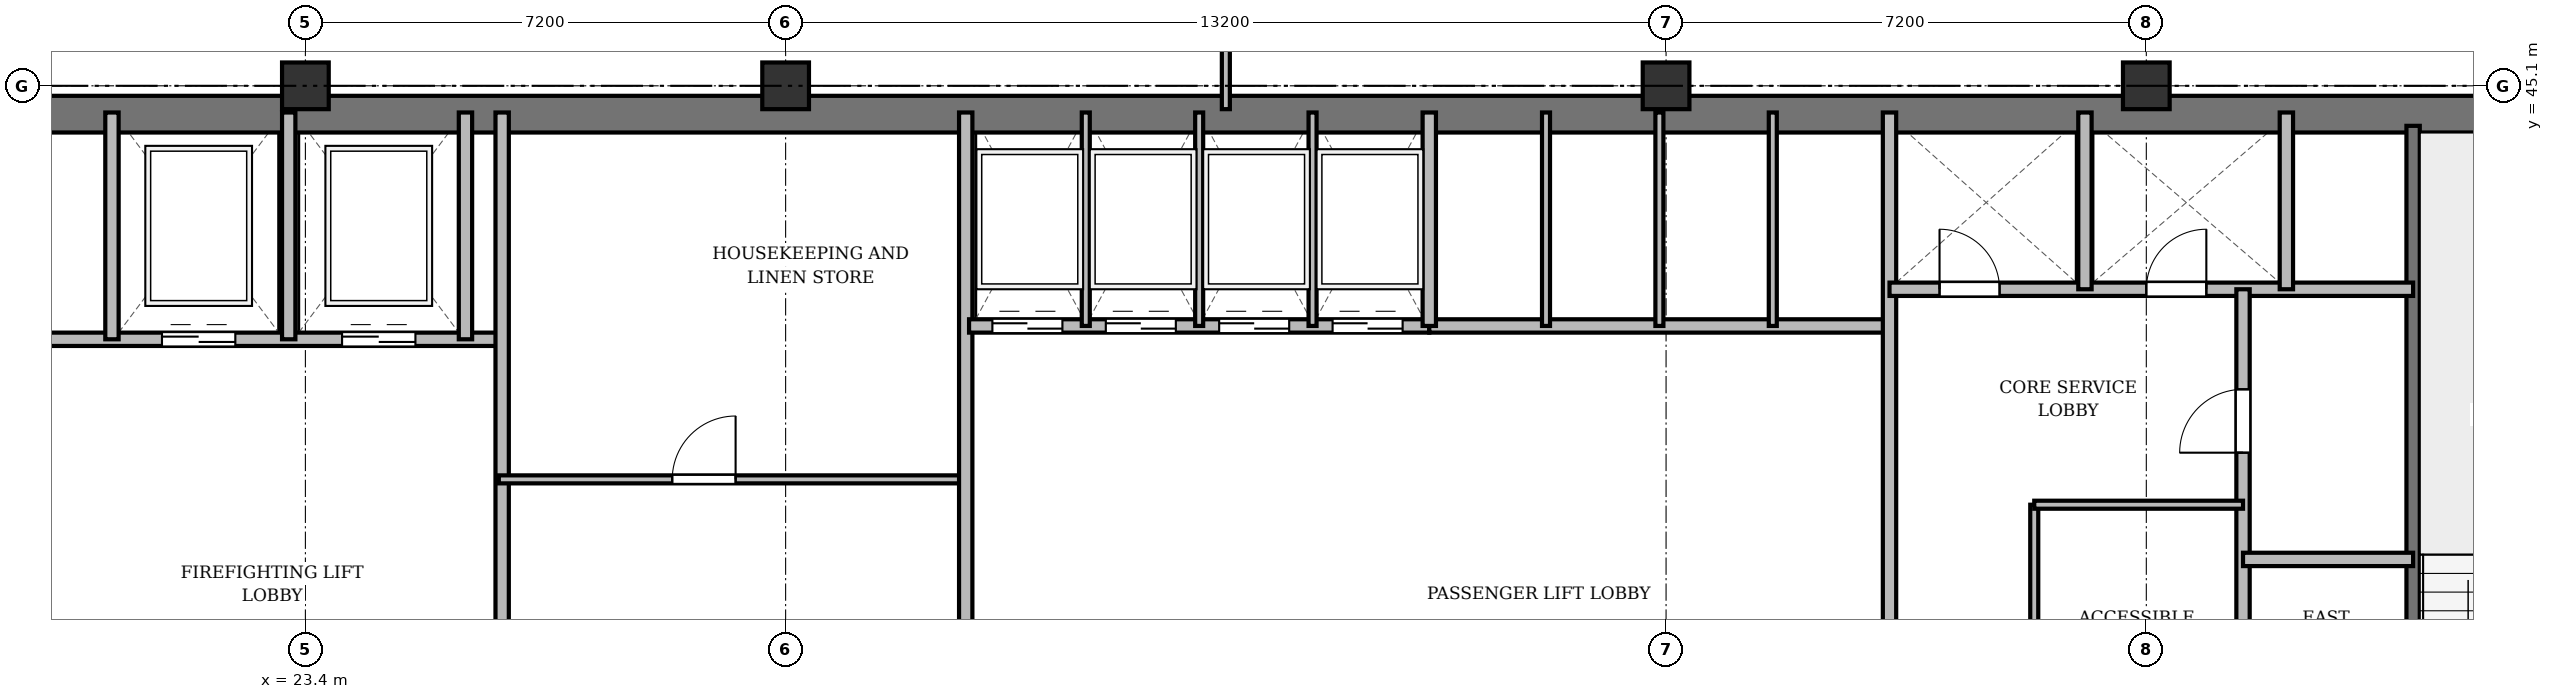
"""IFC4 building model, lengths in metres.
Left out: names, types, materials, properties, quantities, classifications, styles, units other than length and angle.
Written with IfcOpenShell. Run it as: python <this file> out.ifc"""

import sys

from ifc_helpers import new_model, si_unit, direction, frame, frame_2d, origin, origin_2d, place, context, subcontext, project, spatial, rectangle, extrude, source, transform, mapped, element, fill, save


model = new_model("IFC4")
c1 = context("Model", 3, precision=1e-05, world=origin(), true_north=direction((0.0, 1.0)))
c2 = subcontext(c1, "Body", "Model", "MODEL_VIEW")
j1 = project(units=[si_unit("LENGTHUNIT", "METRE"), si_unit("PLANEANGLEUNIT", "RADIAN")], contexts=[c1])
p1 = place(None, origin())
s1 = spatial("IfcSite", under=j1, at=p1, CompositionType="ELEMENT")
p2 = place(p1, origin())
s2 = spatial("IfcBuilding", under=s1, at=p2, CompositionType="ELEMENT")
p3 = place(p2, frame((0.0, 0.0, 146.5)))
s3 = spatial("IfcBuildingStorey", under=s2, at=p3, CompositionType="ELEMENT", Elevation=146.5)
m1 = source(origin(), c2, "Body", "SweptSolid", [
    extrude(rectangle(XDim=0.7, YDim=0.7, at=origin_2d()), origin(), (0.0, 0.0, 1.0), 3.6),
])
for number, where, z_axis, x_axis in (
    (1, (23.4, 45.1, 0.0), (0.0, 0.0, 1.0), (1.0, 0.0, 0.0)),
    (2, (30.6, 45.1, 0.0), (0.0, 0.0, 1.0), (1.0, 0.0, 0.0)),
    (3, (43.8, 45.1, 0.0), (0.0, 0.0, 1.0), (1.0, 0.0, 0.0)),
    (4, (51.0, 45.1, 0.0), (0.0, 0.0, 1.0), (1.0, 0.0, 0.0)),
):
    element("IfcColumn", number, at=place(p3, frame(where, z_axis=z_axis, x_axis=x_axis)), inside=s3, PredefinedType="COLUMN", context=c2, shape_type="MappedRepresentation", body=[
        mapped(m1, transform((0.0, 0.0, 0.0), x_axis=(1.0, 0.0, 0.0), y_axis=(0.0, 1.0, 0.0), z_axis=(0.0, 0.0, 1.0), scale=1.0)),
    ])
p4 = place(p3, frame((15.65, 44.675, 0.0), z_axis=(0.0, 0.0, 1.0), x_axis=(1.0, 0.0, 0.0)))
e5 = element("IfcWall", 5, at=p4, inside=s3, PredefinedType="SHEAR", context=c2, shape_type="SweptSolid", body=[
    extrude(rectangle(XDim=43.1, YDim=0.55, at=frame_2d((21.55, 0.0))), origin(), (0.0, 0.0, 1.0), 3.35),
])
p5 = place(p3, frame((55.0, 33.4, 0.0), z_axis=(0.0, 0.0, 1.0), x_axis=(0.0, 1.0, 0.0)))
e6 = element("IfcWall", 6, at=p5, inside=s3, PredefinedType="SHEAR", context=c2, shape_type="SweptSolid", body=[
    extrude(rectangle(XDim=11.1, YDim=0.2, at=frame_2d((5.55, 0.0))), origin(), (0.0, 0.0, 1.0), 3.35),
])
p6 = place(p5, frame((0.85, 0.0, 0.0)))
e7 = element("IfcOpeningElement", 7, at=p6, cuts=e6, PredefinedType="OPENING", context=c2, shape_type="SweptSolid", body=[
    extrude(rectangle(XDim=1.1, YDim=2.15, at=frame_2d((0.55, 1.075))), frame((0.0, 0.11, 0.0), z_axis=(0.0, -1.0, 0.0), x_axis=(1.0, 0.0, 0.0)), (0.0, 0.0, 1.0), 0.22),
])
p7 = place(p3, frame((19.55, 41.3, 0.0), z_axis=(0.0, 0.0, 1.0), x_axis=(1.0, 0.0, 0.0)))
e8 = element("IfcWall", 8, at=p7, inside=s3, PredefinedType="SOLIDWALL", context=c2, shape_type="SweptSolid", body=[
    extrude(rectangle(XDim=6.75, YDim=0.2, at=frame_2d((3.375, 0.0))), origin(), (0.0, 0.0, 1.0), 3.35),
])
p8 = place(p7, frame((1.7, 0.0, 0.0)))
e9 = element("IfcOpeningElement", 9, at=p8, cuts=e8, PredefinedType="OPENING", context=c2, shape_type="SweptSolid", body=[
    extrude(rectangle(XDim=1.1, YDim=2.15, at=frame_2d((0.55, 1.075))), frame((0.0, 0.11, 0.0), z_axis=(0.0, -1.0, 0.0), x_axis=(1.0, 0.0, 0.0)), (0.0, 0.0, 1.0), 0.22),
])
p9 = place(p7, frame((4.4, 0.0, 0.0)))
e10 = element("IfcOpeningElement", 10, at=p9, cuts=e8, PredefinedType="OPENING", context=c2, shape_type="SweptSolid", body=[
    extrude(rectangle(XDim=1.1, YDim=2.15, at=frame_2d((0.55, 1.075))), frame((0.0, 0.11, 0.0), z_axis=(0.0, -1.0, 0.0), x_axis=(1.0, 0.0, 0.0)), (0.0, 0.0, 1.0), 0.22),
])
for number, where, z_axis, x_axis in (
    (11, (20.5, 41.3, 0.0), (0.0, 0.0, 1.0), (0.0, 1.0, 0.0)),
    (12, (23.15, 41.3, 0.0), (0.0, 0.0, 1.0), (0.0, 1.0, 0.0)),
    (13, (25.8, 41.3, 0.0), (0.0, 0.0, 1.0), (0.0, 1.0, 0.0)),
):
    element("IfcWall", number, at=place(p3, frame(where, z_axis=z_axis, x_axis=x_axis)), inside=s3, PredefinedType="SOLIDWALL", context=c2, shape_type="SweptSolid", body=[
        extrude(rectangle(XDim=3.4, YDim=0.2, at=frame_2d((1.7, 0.0))), origin(), (0.0, 0.0, 1.0), 3.35),
    ])
p10 = place(p3, frame((26.35, 33.4, 0.0), z_axis=(0.0, 0.0, 1.0), x_axis=(0.0, 1.0, 0.0)))
e14 = element("IfcWall", 14, at=p10, inside=s3, PredefinedType="SOLIDWALL", context=c2, shape_type="SweptSolid", body=[
    extrude(rectangle(XDim=11.3, YDim=0.2, at=frame_2d((5.65, 0.0))), origin(), (0.0, 0.0, 1.0), 2.75),
])
p11 = place(p3, frame((26.3, 39.2, 0.0), z_axis=(0.0, 0.0, 1.0), x_axis=(1.0, 0.0, 0.0)))
e15 = element("IfcWall", 15, at=p11, inside=s3, PredefinedType="PARTITIONING", context=c2, shape_type="SweptSolid", body=[
    extrude(rectangle(XDim=7.0, YDim=0.12, at=frame_2d((3.5, 0.0))), origin(), (0.0, 0.0, 1.0), 2.85),
])
p12 = place(p11, frame((2.6, 0.0, 0.0)))
e16 = element("IfcOpeningElement", 16, at=p12, cuts=e15, PredefinedType="OPENING", context=c2, shape_type="SweptSolid", body=[
    extrude(rectangle(XDim=0.95, YDim=2.15, at=frame_2d((0.475, 1.075))), frame((0.0, 0.07, 0.0), z_axis=(0.0, -1.0, 0.0), x_axis=(1.0, 0.0, 0.0)), (0.0, 0.0, 1.0), 0.14),
])
p13 = place(p3, frame((33.3, 33.4, 0.0), z_axis=(0.0, 0.0, 1.0), x_axis=(0.0, 1.0, 0.0)))
e17 = element("IfcWall", 17, at=p13, inside=s3, PredefinedType="SOLIDWALL", context=c2, shape_type="SweptSolid", body=[
    extrude(rectangle(XDim=11.3, YDim=0.2, at=frame_2d((5.65, 0.0))), origin(), (0.0, 0.0, 1.0), 2.75),
])
p14 = place(p3, frame((33.35, 41.5, 0.0), z_axis=(0.0, 0.0, 1.0), x_axis=(1.0, 0.0, 0.0)))
e18 = element("IfcWall", 18, at=p14, inside=s3, PredefinedType="SOLIDWALL", context=c2, shape_type="SweptSolid", body=[
    extrude(rectangle(XDim=6.9, YDim=0.2, at=frame_2d((3.45, 0.0))), origin(), (0.0, 0.0, 1.0), 3.35),
])
p15 = place(p14, frame((0.35, 0.0, 0.0)))
e19 = element("IfcOpeningElement", 19, at=p15, cuts=e18, PredefinedType="OPENING", context=c2, shape_type="SweptSolid", body=[
    extrude(rectangle(XDim=1.05, YDim=2.15, at=frame_2d((0.525, 1.075))), frame((0.0, 0.11, 0.0), z_axis=(0.0, -1.0, 0.0), x_axis=(1.0, 0.0, 0.0)), (0.0, 0.0, 1.0), 0.22),
])
p16 = place(p14, frame((2.05, 0.0, 0.0)))
e20 = element("IfcOpeningElement", 20, at=p16, cuts=e18, PredefinedType="OPENING", context=c2, shape_type="SweptSolid", body=[
    extrude(rectangle(XDim=1.05, YDim=2.15, at=frame_2d((0.525, 1.075))), frame((0.0, 0.11, 0.0), z_axis=(0.0, -1.0, 0.0), x_axis=(1.0, 0.0, 0.0)), (0.0, 0.0, 1.0), 0.22),
])
p17 = place(p14, frame((3.75, 0.0, 0.0)))
e21 = element("IfcOpeningElement", 21, at=p17, cuts=e18, PredefinedType="OPENING", context=c2, shape_type="SweptSolid", body=[
    extrude(rectangle(XDim=1.05, YDim=2.15, at=frame_2d((0.525, 1.075))), frame((0.0, 0.11, 0.0), z_axis=(0.0, -1.0, 0.0), x_axis=(1.0, 0.0, 0.0)), (0.0, 0.0, 1.0), 0.22),
])
p18 = place(p14, frame((5.45, 0.0, 0.0)))
e22 = element("IfcOpeningElement", 22, at=p18, cuts=e18, PredefinedType="OPENING", context=c2, shape_type="SweptSolid", body=[
    extrude(rectangle(XDim=1.05, YDim=2.15, at=frame_2d((0.525, 1.075))), frame((0.0, 0.11, 0.0), z_axis=(0.0, -1.0, 0.0), x_axis=(1.0, 0.0, 0.0)), (0.0, 0.0, 1.0), 0.22),
])
for number, where, z_axis, x_axis in (
    (23, (35.1, 41.5, 0.0), (0.0, 0.0, 1.0), (0.0, 1.0, 0.0)),
    (24, (36.8, 41.5, 0.0), (0.0, 0.0, 1.0), (0.0, 1.0, 0.0)),
    (25, (38.5, 41.5, 0.0), (0.0, 0.0, 1.0), (0.0, 1.0, 0.0)),
):
    element("IfcWall", number, at=place(p3, frame(where, z_axis=z_axis, x_axis=x_axis)), inside=s3, PredefinedType="PARTITIONING", context=c2, shape_type="SweptSolid", body=[
        extrude(rectangle(XDim=3.2, YDim=0.12, at=frame_2d((1.6, 0.0))), origin(), (0.0, 0.0, 1.0), 3.35),
    ])
p19 = place(p3, frame((40.25, 41.5, 0.0), z_axis=(0.0, 0.0, 1.0), x_axis=(1.0, 0.0, 0.0)))
e26 = element("IfcWall", 26, at=p19, inside=s3, PredefinedType="SOLIDWALL", context=c2, shape_type="SweptSolid", body=[
    extrude(rectangle(XDim=6.9, YDim=0.2, at=frame_2d((3.45, 0.0))), origin(), (0.0, 0.0, 1.0), 2.85),
])
p20 = place(p3, frame((40.25, 41.5, 0.0), z_axis=(0.0, 0.0, 1.0), x_axis=(0.0, 1.0, 0.0)))
e27 = element("IfcWall", 27, at=p20, inside=s3, PredefinedType="SOLIDWALL", context=c2, shape_type="SweptSolid", body=[
    extrude(rectangle(XDim=3.2, YDim=0.2, at=frame_2d((1.6, 0.0))), origin(), (0.0, 0.0, 1.0), 3.35),
])
p21 = place(p3, frame((42.0, 41.5, 0.0), z_axis=(0.0, 0.0, 1.0), x_axis=(0.0, 1.0, 0.0)))
e28 = element("IfcWall", 28, at=p21, inside=s3, PredefinedType="PARTITIONING", context=c2, shape_type="SweptSolid", body=[
    extrude(rectangle(XDim=3.2, YDim=0.12, at=frame_2d((1.6, 0.0))), origin(), (0.0, 0.0, 1.0), 3.35),
])
p22 = place(p3, frame((43.7, 41.5, 0.0), z_axis=(0.0, 0.0, 1.0), x_axis=(0.0, 1.0, 0.0)))
e29 = element("IfcWall", 29, at=p22, inside=s3, PredefinedType="PARTITIONING", context=c2, shape_type="SweptSolid", body=[
    extrude(rectangle(XDim=3.2, YDim=0.12, at=frame_2d((1.6, 0.0))), origin(), (0.0, 0.0, 1.0), 2.85),
])
p23 = place(p3, frame((45.4, 41.5, 0.0), z_axis=(0.0, 0.0, 1.0), x_axis=(0.0, 1.0, 0.0)))
e30 = element("IfcWall", 30, at=p23, inside=s3, PredefinedType="PARTITIONING", context=c2, shape_type="SweptSolid", body=[
    extrude(rectangle(XDim=3.2, YDim=0.12, at=frame_2d((1.6, 0.0))), origin(), (0.0, 0.0, 1.0), 3.35),
])
p24 = place(p3, frame((47.15, 33.4, 0.0), z_axis=(0.0, 0.0, 1.0), x_axis=(0.0, 1.0, 0.0)))
e31 = element("IfcWall", 31, at=p24, inside=s3, PredefinedType="SOLIDWALL", context=c2, shape_type="SweptSolid", body=[
    extrude(rectangle(XDim=11.3, YDim=0.2, at=frame_2d((5.65, 0.0))), origin(), (0.0, 0.0, 1.0), 2.75),
])
p25 = place(p3, frame((47.15, 42.05, 0.0), z_axis=(0.0, 0.0, 1.0), x_axis=(1.0, 0.0, 0.0)))
e32 = element("IfcWall", 32, at=p25, inside=s3, PredefinedType="SOLIDWALL", context=c2, shape_type="SweptSolid", body=[
    extrude(rectangle(XDim=7.85, YDim=0.2, at=frame_2d((3.925, 0.0))), origin(), (0.0, 0.0, 1.0), 2.85),
])
p26 = place(p25, frame((0.75, 0.0, 0.0)))
e33 = element("IfcOpeningElement", 33, at=p26, cuts=e32, PredefinedType="OPENING", context=c2, shape_type="SweptSolid", body=[
    extrude(rectangle(XDim=0.9, YDim=2.1, at=frame_2d((0.45, 1.05))), frame((0.0, 0.11, 0.0), z_axis=(0.0, -1.0, 0.0), x_axis=(1.0, 0.0, 0.0)), (0.0, 0.0, 1.0), 0.22),
])
p27 = place(p25, frame((3.85, 0.0, 0.0)))
e34 = element("IfcOpeningElement", 34, at=p27, cuts=e32, PredefinedType="OPENING", context=c2, shape_type="SweptSolid", body=[
    extrude(rectangle(XDim=0.9, YDim=2.1, at=frame_2d((0.45, 1.05))), frame((0.0, 0.11, 0.0), z_axis=(0.0, -1.0, 0.0), x_axis=(1.0, 0.0, 0.0)), (0.0, 0.0, 1.0), 0.22),
])
for number, where, z_axis, x_axis in (
    (35, (50.08, 42.05, 0.0), (0.0, 0.0, 1.0), (0.0, 1.0, 0.0)),
    (36, (53.1, 42.05, 0.0), (0.0, 0.0, 1.0), (0.0, 1.0, 0.0)),
):
    element("IfcWall", number, at=place(p3, frame(where, z_axis=z_axis, x_axis=x_axis)), inside=s3, PredefinedType="SOLIDWALL", context=c2, shape_type="SweptSolid", body=[
        extrude(rectangle(XDim=2.65, YDim=0.2, at=frame_2d((1.325, 0.0))), origin(), (0.0, 0.0, 1.0), 3.35),
    ])
p28 = place(p3, frame((52.45, 33.4, 0.0), z_axis=(0.0, 0.0, 1.0), x_axis=(0.0, 1.0, 0.0)))
e37 = element("IfcWall", 37, at=p28, inside=s3, PredefinedType="PARTITIONING", context=c2, shape_type="SweptSolid", body=[
    extrude(rectangle(XDim=8.65, YDim=0.2, at=frame_2d((4.325, 0.0))), origin(), (0.0, 0.0, 1.0), 2.75),
])
p29 = place(p28, frame((6.2, 0.0, 0.0)))
e38 = element("IfcOpeningElement", 38, at=p29, cuts=e37, PredefinedType="OPENING", context=c2, shape_type="SweptSolid", body=[
    extrude(rectangle(XDim=0.95, YDim=2.15, at=frame_2d((0.475, 1.075))), frame((0.0, 0.11, 0.0), z_axis=(0.0, -1.0, 0.0), x_axis=(1.0, 0.0, 0.0)), (0.0, 0.0, 1.0), 0.22),
])
p30 = place(p3, frame((52.45, 38.0, 0.0), z_axis=(0.0, 0.0, 1.0), x_axis=(1.0, 0.0, 0.0)))
e39 = element("IfcWall", 39, at=p30, inside=s3, PredefinedType="PARTITIONING", context=c2, shape_type="SweptSolid", body=[
    extrude(rectangle(XDim=2.55, YDim=0.2, at=frame_2d((1.275, 0.0))), origin(), (0.0, 0.0, 1.0), 3.35),
])
p31 = place(p3, frame((49.32, 33.4, 0.0), z_axis=(0.0, 0.0, 1.0), x_axis=(0.0, 1.0, 0.0)))
e40 = element("IfcWall", 40, at=p31, inside=s3, PredefinedType="PARTITIONING", context=c2, shape_type="SweptSolid", body=[
    extrude(rectangle(XDim=5.42, YDim=0.12, at=frame_2d((2.71, 0.0))), origin(), (0.0, 0.0, 1.0), 2.75),
])
p32 = place(p31, frame((1.6, 0.0, 0.0)))
e41 = element("IfcOpeningElement", 41, at=p32, cuts=e40, PredefinedType="OPENING", context=c2, shape_type="SweptSolid", body=[
    extrude(rectangle(XDim=0.95, YDim=2.15, at=frame_2d((0.475, 1.075))), frame((0.0, 0.07, 0.0), z_axis=(0.0, -1.0, 0.0), x_axis=(1.0, 0.0, 0.0)), (0.0, 0.0, 1.0), 0.14),
])
p33 = place(p3, frame((49.32, 38.82, 0.0), z_axis=(0.0, 0.0, 1.0), x_axis=(1.0, 0.0, 0.0)))
e42 = element("IfcWall", 42, at=p33, inside=s3, PredefinedType="PARTITIONING", context=c2, shape_type="SweptSolid", body=[
    extrude(rectangle(XDim=3.13, YDim=0.12, at=frame_2d((1.565, 0.0))), origin(), (0.0, 0.0, 1.0), 2.85),
])
p34 = place(p3, frame((37.2, 44.75, 0.0), z_axis=(0.0, 0.0, 1.0), x_axis=(0.0, 1.0, 0.0)))
e43 = element("IfcWall", 43, at=p34, inside=s3, PredefinedType="PARTITIONING", context=c2, shape_type="SweptSolid", body=[
    extrude(rectangle(XDim=3.61, YDim=0.12, at=frame_2d((1.805, 0.0))), origin(), (0.0, 0.0, 1.0), 2.75),
])
p35 = place(p34, frame((1.1, 0.0, 0.0)))
e44 = element("IfcOpeningElement", 44, at=p35, cuts=e43, PredefinedType="OPENING", context=c2, shape_type="SweptSolid", body=[
    extrude(rectangle(XDim=0.95, YDim=2.15, at=frame_2d((0.475, 1.075))), frame((0.0, 0.07, 0.0), z_axis=(0.0, -1.0, 0.0), x_axis=(1.0, 0.0, 0.0)), (0.0, 0.0, 1.0), 0.14),
])
m2 = source(origin(), c2, "Body", "SweptSolid", [
    extrude(rectangle(XDim=1.1, YDim=2.15, at=frame_2d((0.55, 1.075))), frame((0.0, 0.025, 0.0), z_axis=(0.0, -1.0, 0.0), x_axis=(1.0, 0.0, 0.0)), (0.0, 0.0, 1.0), 0.05),
])
p36 = place(p8, origin())
e45 = element("IfcDoor", 45, at=p36, inside=s3, OperationType="DOUBLE_DOOR_SLIDING", PredefinedType="DOOR", context=c2, shape_type="MappedRepresentation", body=[
    mapped(m2, transform((0.0, 0.0, 0.0), x_axis=(1.0, 0.0, 0.0), y_axis=(0.0, 1.0, 0.0), z_axis=(0.0, 0.0, 1.0), scale=1.0)),
])
fill(e9, e45)
p37 = place(p9, origin())
e46 = element("IfcDoor", 46, at=p37, inside=s3, OperationType="DOUBLE_DOOR_SLIDING", PredefinedType="DOOR", context=c2, shape_type="MappedRepresentation", body=[
    mapped(m2, transform((0.0, 0.0, 0.0), x_axis=(1.0, 0.0, 0.0), y_axis=(0.0, 1.0, 0.0), z_axis=(0.0, 0.0, 1.0), scale=1.0)),
])
fill(e10, e46)
m3 = source(origin(), c2, "Body", "SweptSolid", [
    extrude(rectangle(XDim=0.95, YDim=2.15, at=frame_2d((0.475, 1.075))), frame((0.0, 0.025, 0.0), z_axis=(0.0, -1.0, 0.0), x_axis=(1.0, 0.0, 0.0)), (0.0, 0.0, 1.0), 0.05),
])
p38 = place(p12, origin())
e47 = element("IfcDoor", 47, at=p38, inside=s3, OperationType="SINGLE_SWING_RIGHT", PredefinedType="DOOR", context=c2, shape_type="MappedRepresentation", body=[
    mapped(m3, transform((0.0, 0.0, 0.0), x_axis=(1.0, 0.0, 0.0), y_axis=(0.0, 1.0, 0.0), z_axis=(0.0, 0.0, 1.0), scale=1.0)),
])
fill(e16, e47)
m4 = source(origin(), c2, "Body", "SweptSolid", [
    extrude(rectangle(XDim=1.05, YDim=2.15, at=frame_2d((0.525, 1.075))), frame((0.0, 0.025, 0.0), z_axis=(0.0, -1.0, 0.0), x_axis=(1.0, 0.0, 0.0)), (0.0, 0.0, 1.0), 0.05),
])
p39 = place(p15, origin())
e48 = element("IfcDoor", 48, at=p39, inside=s3, OperationType="DOUBLE_DOOR_SLIDING", PredefinedType="DOOR", context=c2, shape_type="MappedRepresentation", body=[
    mapped(m4, transform((0.0, 0.0, 0.0), x_axis=(1.0, 0.0, 0.0), y_axis=(0.0, 1.0, 0.0), z_axis=(0.0, 0.0, 1.0), scale=1.0)),
])
fill(e19, e48)
p40 = place(p16, origin())
e49 = element("IfcDoor", 49, at=p40, inside=s3, OperationType="DOUBLE_DOOR_SLIDING", PredefinedType="DOOR", context=c2, shape_type="MappedRepresentation", body=[
    mapped(m4, transform((0.0, 0.0, 0.0), x_axis=(1.0, 0.0, 0.0), y_axis=(0.0, 1.0, 0.0), z_axis=(0.0, 0.0, 1.0), scale=1.0)),
])
fill(e20, e49)
p41 = place(p17, origin())
e50 = element("IfcDoor", 50, at=p41, inside=s3, OperationType="DOUBLE_DOOR_SLIDING", PredefinedType="DOOR", context=c2, shape_type="MappedRepresentation", body=[
    mapped(m4, transform((0.0, 0.0, 0.0), x_axis=(1.0, 0.0, 0.0), y_axis=(0.0, 1.0, 0.0), z_axis=(0.0, 0.0, 1.0), scale=1.0)),
])
fill(e21, e50)
p42 = place(p18, origin())
e51 = element("IfcDoor", 51, at=p42, inside=s3, OperationType="DOUBLE_DOOR_SLIDING", PredefinedType="DOOR", context=c2, shape_type="MappedRepresentation", body=[
    mapped(m4, transform((0.0, 0.0, 0.0), x_axis=(1.0, 0.0, 0.0), y_axis=(0.0, 1.0, 0.0), z_axis=(0.0, 0.0, 1.0), scale=1.0)),
])
fill(e22, e51)
m5 = source(origin(), c2, "Body", "SweptSolid", [
    extrude(rectangle(XDim=0.9, YDim=2.1, at=frame_2d((0.45, 1.05))), frame((0.0, 0.025, 0.0), z_axis=(0.0, -1.0, 0.0), x_axis=(1.0, 0.0, 0.0)), (0.0, 0.0, 1.0), 0.05),
])
p43 = place(p26, origin())
e52 = element("IfcDoor", 52, at=p43, inside=s3, OperationType="SINGLE_SWING_LEFT", PredefinedType="DOOR", context=c2, shape_type="MappedRepresentation", body=[
    mapped(m5, transform((0.0, 0.0, 0.0), x_axis=(1.0, 0.0, 0.0), y_axis=(0.0, 1.0, 0.0), z_axis=(0.0, 0.0, 1.0), scale=1.0)),
])
fill(e33, e52)
p44 = place(p27, origin())
e53 = element("IfcDoor", 53, at=p44, inside=s3, OperationType="SINGLE_SWING_RIGHT", PredefinedType="DOOR", context=c2, shape_type="MappedRepresentation", body=[
    mapped(m5, transform((0.0, 0.0, 0.0), x_axis=(1.0, 0.0, 0.0), y_axis=(0.0, 1.0, 0.0), z_axis=(0.0, 0.0, 1.0), scale=1.0)),
])
fill(e34, e53)
p45 = place(p29, origin())
e54 = element("IfcDoor", 54, at=p45, inside=s3, OperationType="SINGLE_SWING_LEFT", PredefinedType="DOOR", context=c2, shape_type="MappedRepresentation", body=[
    mapped(m3, transform((0.0, 0.0, 0.0), x_axis=(1.0, 0.0, 0.0), y_axis=(0.0, 1.0, 0.0), z_axis=(0.0, 0.0, 1.0), scale=1.0)),
])
fill(e38, e54)
save(model, sys.argv[1])
